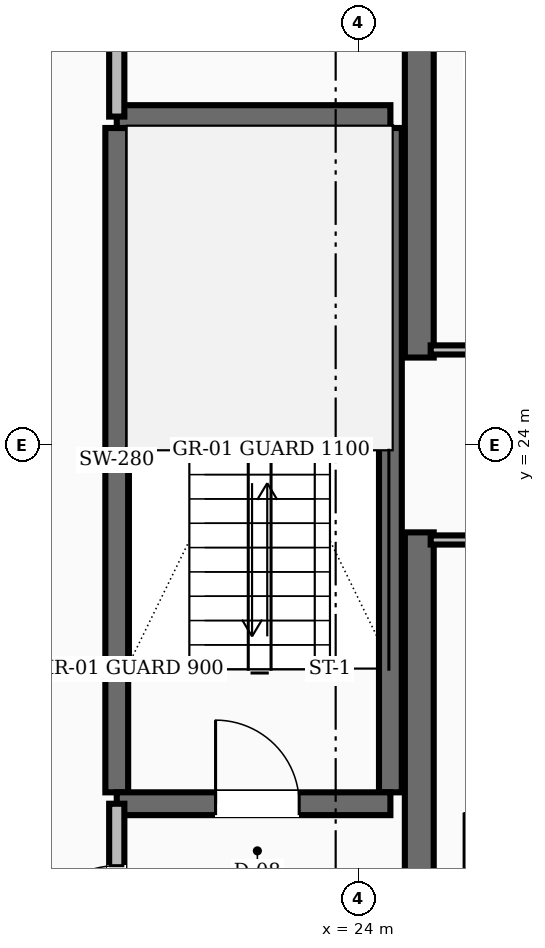
"""IFC4 building model, lengths in metres.
Left out: names, types, materials, properties, quantities, classifications, styles, units other than length and angle.
Written with IfcOpenShell. Run it as: python <this file> out.ifc"""

import sys

from ifc_helpers import new_model, si_unit, direction, frame, frame_2d, origin, place, context, subcontext, project, spatial, rectangle, extrude, element, fill, save


model = new_model("IFC4")
c1 = context("Model", 3, precision=1e-05, world=origin(), true_north=direction((0.0, 1.0)))
c2 = subcontext(c1, "Body", "Model", "MODEL_VIEW")
j1 = project(units=[si_unit("LENGTHUNIT", "METRE"), si_unit("PLANEANGLEUNIT", "RADIAN")], contexts=[c1])
p1 = place(None, origin())
s1 = spatial("IfcSite", under=j1, at=p1, CompositionType="ELEMENT")
p2 = place(p1, origin())
s2 = spatial("IfcBuilding", under=s1, at=p2, CompositionType="ELEMENT")
p3 = place(p2, frame((0.0, 0.0, 102.4)))
s3 = spatial("IfcBuildingStorey", under=s2, at=p3, CompositionType="ELEMENT", Elevation=102.4)
for number, where, z_axis, x_axis in (
    (1, (24.8, 16.55, 0.0), (0.0, 0.0, 1.0), (0.0, 1.0, 0.0)),
    (2, (24.8, 25.15, 0.0), (0.0, 0.0, 1.0), (0.0, 1.0, 0.0)),
):
    element("IfcWall", number, at=place(p3, frame(where, z_axis=z_axis, x_axis=x_axis)), inside=s3, PredefinedType="SHEAR", context=c2, shape_type="SweptSolid", body=[
        extrude(rectangle(XDim=6.3, YDim=0.38, at=frame_2d((3.15, 0.0))), origin(), (0.0, 0.0, 1.0), 3.6),
    ])
for number, where, z_axis, x_axis in (
    (3, (20.82, 19.43, 0.0), (0.0, 0.0, 1.0), (0.0, 1.0, 0.0)),
    (4, (24.42, 19.43, 0.0), (0.0, 0.0, 1.0), (0.0, 1.0, 0.0)),
):
    element("IfcWall", number, at=place(p3, frame(where, z_axis=z_axis, x_axis=x_axis)), inside=s3, PredefinedType="SHEAR", context=c2, shape_type="SweptSolid", body=[
        extrude(rectangle(XDim=8.74, YDim=0.3, at=frame_2d((4.37, 0.0))), origin(), (0.0, 0.0, 1.0), 3.6),
    ])
p4 = place(p3, frame((20.82, 19.28, 0.0), z_axis=(0.0, 0.0, 1.0), x_axis=(1.0, 0.0, 0.0)))
e5 = element("IfcWall", 5, at=p4, inside=s3, PredefinedType="SHEAR", context=c2, shape_type="SweptSolid", body=[
    extrude(rectangle(XDim=3.6, YDim=0.3, at=frame_2d((1.8, 0.0))), origin(), (0.0, 0.0, 1.0), 3.6),
])
p5 = place(p4, frame((1.3, 0.0, 0.0)))
e6 = element("IfcOpeningElement", 6, at=p5, cuts=e5, PredefinedType="OPENING", context=c2, shape_type="SweptSolid", body=[
    extrude(rectangle(XDim=1.1, YDim=2.1, at=frame_2d((0.55, 1.05))), frame((0.0, 0.16, 0.0), z_axis=(0.0, -1.0, 0.0), x_axis=(1.0, 0.0, 0.0)), (0.0, 0.0, 1.0), 0.32),
])
p6 = place(p3, frame((20.82, 28.32, 0.0), z_axis=(0.0, 0.0, 1.0), x_axis=(1.0, 0.0, 0.0)))
e7 = element("IfcWall", 7, at=p6, inside=s3, PredefinedType="SHEAR", context=c2, shape_type="SweptSolid", body=[
    extrude(rectangle(XDim=3.6, YDim=0.3, at=frame_2d((1.8, 0.0))), origin(), (0.0, 0.0, 1.0), 3.6),
])
p7 = place(p3, frame((20.82, 16.55, 0.0), z_axis=(0.0, 0.0, 1.0), x_axis=(0.0, 1.0, 0.0)))
e8 = element("IfcWall", 8, at=p7, inside=s3, PredefinedType="SOLIDWALL", context=c2, shape_type="SweptSolid", body=[
    extrude(rectangle(XDim=2.73, YDim=0.2, at=frame_2d((1.365, 0.0))), origin(), (0.0, 0.0, 1.0), 2.67),
])
p8 = place(p7, frame((0.815, 0.0, 0.0)))
e9 = element("IfcOpeningElement", 9, at=p8, cuts=e8, PredefinedType="OPENING", context=c2, shape_type="SweptSolid", body=[
    extrude(rectangle(XDim=1.1, YDim=2.1, at=frame_2d((0.55, 1.05))), frame((0.0, 0.11, 0.0), z_axis=(0.0, -1.0, 0.0), x_axis=(1.0, 0.0, 0.0)), (0.0, 0.0, 1.0), 0.22),
])
p9 = place(p3, frame((20.82, 28.32, 0.0), z_axis=(0.0, 0.0, 1.0), x_axis=(0.0, 1.0, 0.0)))
e10 = element("IfcWall", 10, at=p9, inside=s3, PredefinedType="SOLIDWALL", context=c2, shape_type="SweptSolid", body=[
    extrude(rectangle(XDim=3.13, YDim=0.2, at=frame_2d((1.565, 0.0))), origin(), (0.0, 0.0, 1.0), 2.67),
])
p10 = place(p9, frame((1.09, 0.0, 0.0)))
e11 = element("IfcOpeningElement", 11, at=p10, cuts=e10, PredefinedType="OPENING", context=c2, shape_type="SweptSolid", body=[
    extrude(rectangle(XDim=0.95, YDim=2.1, at=frame_2d((0.475, 1.05))), frame((0.0, 0.11, 0.0), z_axis=(0.0, -1.0, 0.0), x_axis=(1.0, 0.0, 0.0)), (0.0, 0.0, 1.0), 0.22),
])
p11 = place(p3, frame((24.95, 25.25, 0.0), z_axis=(0.0, 0.0, 1.0), x_axis=(1.0, 0.0, 0.0)))
e12 = element("IfcWall", 12, at=p11, inside=s3, PredefinedType="PARTITIONING", context=c2, shape_type="SweptSolid", body=[
    extrude(rectangle(XDim=3.2, YDim=0.12, at=frame_2d((1.6, 0.0))), origin(), (0.0, 0.0, 1.0), 2.67),
])
p12 = place(p11, frame((1.125, 0.0, 0.0)))
e13 = element("IfcOpeningElement", 13, at=p12, cuts=e12, PredefinedType="OPENING", context=c2, shape_type="SweptSolid", body=[
    extrude(rectangle(XDim=0.95, YDim=2.1, at=frame_2d((0.475, 1.05))), frame((0.0, 0.07, 0.0), z_axis=(0.0, -1.0, 0.0), x_axis=(1.0, 0.0, 0.0)), (0.0, 0.0, 1.0), 0.14),
])
p13 = place(p3, frame((24.95, 22.75, 0.0), z_axis=(0.0, 0.0, 1.0), x_axis=(1.0, 0.0, 0.0)))
e14 = element("IfcWall", 14, at=p13, inside=s3, PredefinedType="PARTITIONING", context=c2, shape_type="SweptSolid", body=[
    extrude(rectangle(XDim=3.2, YDim=0.12, at=frame_2d((1.6, 0.0))), origin(), (0.0, 0.0, 1.0), 2.67),
])
p14 = place(p13, frame((1.125, 0.0, 0.0)))
e15 = element("IfcOpeningElement", 15, at=p14, cuts=e14, PredefinedType="OPENING", context=c2, shape_type="SweptSolid", body=[
    extrude(rectangle(XDim=0.95, YDim=2.1, at=frame_2d((0.475, 1.05))), frame((0.0, 0.07, 0.0), z_axis=(0.0, -1.0, 0.0), x_axis=(1.0, 0.0, 0.0)), (0.0, 0.0, 1.0), 0.14),
])
p15 = place(p5, origin())
e16 = element("IfcDoor", 16, at=p15, inside=s3, OperationType="SINGLE_SWING_LEFT", PredefinedType="DOOR", context=c2, shape_type="SweptSolid", body=[
    extrude(rectangle(XDim=1.1, YDim=2.1, at=frame_2d((0.55, 1.05))), frame((0.0, 0.025, 0.0), z_axis=(0.0, -1.0, 0.0), x_axis=(1.0, 0.0, 0.0)), (0.0, 0.0, 1.0), 0.05),
])
fill(e6, e16)
p16 = place(p8, origin())
e17 = element("IfcDoor", 17, at=p16, inside=s3, OperationType="SINGLE_SWING_LEFT", PredefinedType="DOOR", context=c2, shape_type="SweptSolid", body=[
    extrude(rectangle(XDim=1.1, YDim=2.1, at=frame_2d((0.55, 1.05))), frame((0.0, 0.025, 0.0), z_axis=(0.0, -1.0, 0.0), x_axis=(1.0, 0.0, 0.0)), (0.0, 0.0, 1.0), 0.05),
])
fill(e9, e17)
save(model, sys.argv[1])
